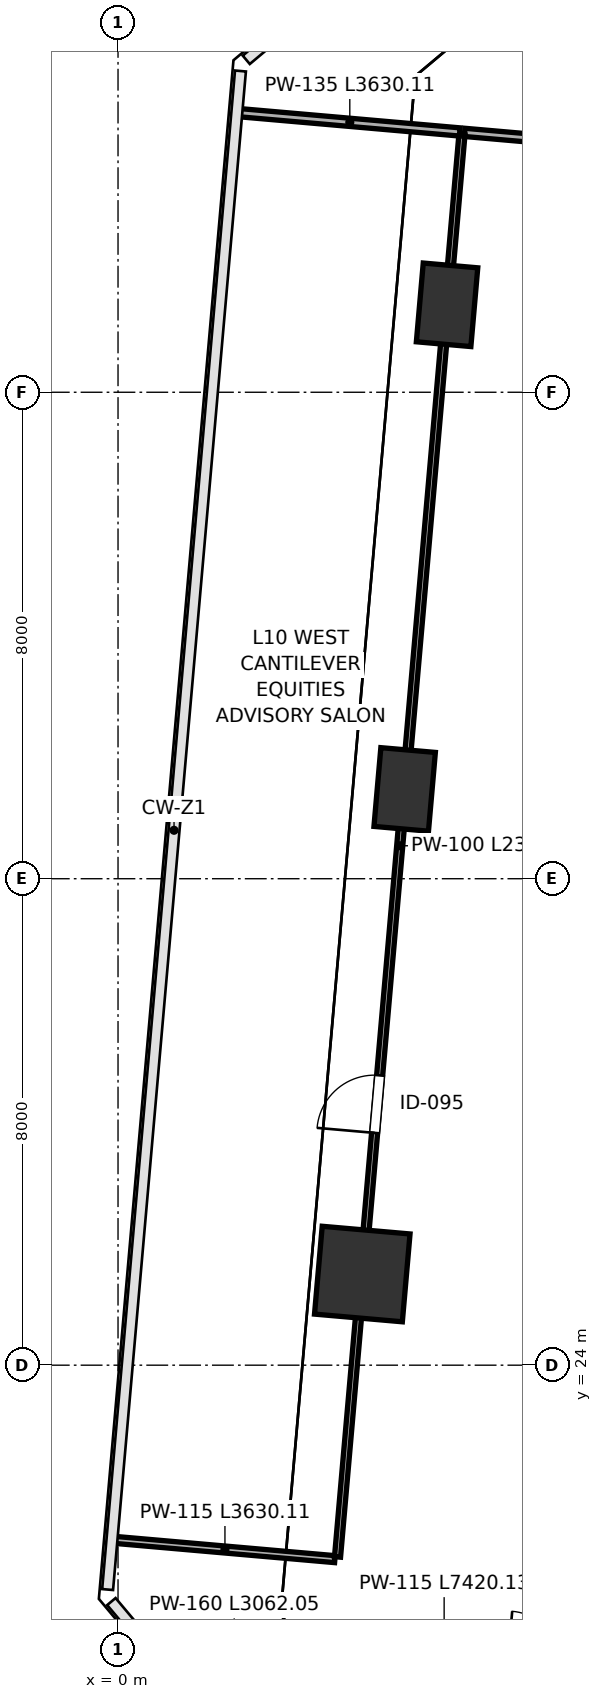
"""IFC4 building model, lengths in metres.
Left out: names, types, materials, properties, quantities, classifications, styles, units other than length and angle.
Written with IfcOpenShell. Run it as: python <this file> out.ifc"""

import sys

from ifc_helpers import new_model, si_unit, direction, frame, frame_2d, origin, origin_2d, place, context, subcontext, project, spatial, rectangle, extrude, source, transform, mapped, element, fill, save


model = new_model("IFC4")
c1 = context("Model", 3, precision=1e-05, world=origin(), true_north=direction((0.0, 1.0)))
c2 = subcontext(c1, "Body", "Model", "MODEL_VIEW")
j1 = project(units=[si_unit("LENGTHUNIT", "METRE"), si_unit("PLANEANGLEUNIT", "RADIAN")], contexts=[c1])
p1 = place(None, origin())
s1 = spatial("IfcSite", under=j1, at=p1, CompositionType="ELEMENT")
p2 = place(p1, origin())
s2 = spatial("IfcBuilding", under=s1, at=p2, CompositionType="ELEMENT")
p3 = place(p2, frame((0.0, 0.0, 47.2)))
s3 = spatial("IfcBuildingStorey", under=s2, at=p3, CompositionType="ELEMENT", Elevation=47.2)
m1 = source(origin(), c2, "Body", "SweptSolid", [
    extrude(rectangle(XDim=1.45, YDim=1.45, at=origin_2d()), origin(), (0.0, 0.0, 1.0), 4.799),
])
p4 = place(p3, frame((4.017, 25.499, 0.001), z_axis=(0.0, 0.0, 1.0), x_axis=(-0.996194698092, 0.087155742748, 0.0)))
e1 = element("IfcColumn", 1, at=p4, inside=s3, PredefinedType="COLUMN", context=c2, shape_type="MappedRepresentation", body=[
    mapped(m1, transform((0.0, 0.0, 0.0), scale=1.0)),
])
m2 = source(origin(), c2, "Body", "SweptSolid", [
    extrude(rectangle(XDim=0.9, YDim=1.3, at=origin_2d()), origin(), (0.0, 0.0, 1.0), 4.799),
])
for number, where, z_axis, x_axis in (
    (2, (4.714, 33.469, 0.001), (0.0, 0.0, 1.0), (-0.996, 0.087, 0.0)),
    (3, (5.411, 41.438, 0.001), (0.0, 0.0, 1.0), (-0.996, 0.087, 0.0)),
):
    element("IfcColumn", number, at=place(p3, frame(where, z_axis=z_axis, x_axis=x_axis)), inside=s3, PredefinedType="PILASTER", context=c2, shape_type="MappedRepresentation", body=[
        mapped(m2, transform((0.0, 0.0, 0.0), scale=1.0)),
    ])
p5 = place(p3, frame((5.7, 44.274, 0.0), z_axis=(0.0, 0.0, 1.0), x_axis=(0.996195324028, -0.087148587968, 0.0)))
e4 = element("IfcWall", 4, at=p5, inside=s3, PredefinedType="PARTITIONING", context=c2, shape_type="SweptSolid", body=[
    extrude(rectangle(XDim=25.07, YDim=0.135, at=frame_2d((12.535, 0.0))), origin(), (0.0, 0.0, 1.0), 4.56),
])
p6 = place(p5, frame((1.05, 0.0, 0.0)))
e5 = element("IfcOpeningElement", 5, at=p6, cuts=e4, PredefinedType="OPENING", context=c2, shape_type="SweptSolid", body=[
    extrude(rectangle(XDim=0.95, YDim=2.15, at=frame_2d((0.475, 1.075))), frame((0.0, 0.078, 0.0), z_axis=(0.0, -1.0, 0.0), x_axis=(1.0, 0.0, 0.0)), (0.0, 0.0, 1.0), 0.155),
])
p7 = place(p3, frame((-0.05, 21.127, 0.0), z_axis=(0.0, 0.0, 1.0), x_axis=(0.996194520424, -0.087157773474, 0.0)))
e6 = element("IfcWall", 6, at=p7, inside=s3, PredefinedType="PARTITIONING", context=c2, shape_type="SweptSolid", body=[
    extrude(rectangle(XDim=3.63, YDim=0.115, at=frame_2d((1.815, 0.0))), origin(), (0.0, 0.0, 1.0), 4.56),
])
p8 = place(p3, frame((3.61, 20.847, 0.0), z_axis=(0.0, 0.0, 1.0), x_axis=(0.087153664928, 0.996194879875, 0.0)))
e7 = element("IfcWall", 7, at=p8, inside=s3, PredefinedType="PARTITIONING", context=c2, shape_type="SweptSolid", body=[
    extrude(rectangle(XDim=23.48, YDim=0.1, at=frame_2d((11.74, 0.0))), origin(), (0.0, 0.0, 1.0), 3.395),
])
p9 = place(p8, frame((7.0, 0.0, 0.0)))
e8 = element("IfcOpeningElement", 8, at=p9, cuts=e7, PredefinedType="OPENING", context=c2, shape_type="SweptSolid", body=[
    extrude(rectangle(XDim=0.95, YDim=2.15, at=frame_2d((0.475, 1.075))), frame((0.0, 0.06, 0.0), z_axis=(0.0, -1.0, 0.0), x_axis=(1.0, 0.0, 0.0)), (0.0, 0.0, 1.0), 0.12),
])
p10 = place(p3, frame((2.004, 44.597, 0.0), z_axis=(0.0, 0.0, 1.0), x_axis=(0.996194520424, -0.087157773474, 0.0)))
e9 = element("IfcWall", 9, at=p10, inside=s3, PredefinedType="PARTITIONING", context=c2, shape_type="SweptSolid", body=[
    extrude(rectangle(XDim=3.63, YDim=0.135, at=frame_2d((1.815, 0.0))), origin(), (0.0, 0.0, 1.0), 4.56),
])
m3 = source(origin(), c2, "Body", "SweptSolid", [
    extrude(rectangle(XDim=0.95, YDim=2.15, at=frame_2d((0.475, 1.075))), frame((0.0, 0.025, 0.0), z_axis=(0.0, -1.0, 0.0), x_axis=(1.0, 0.0, 0.0)), (0.0, 0.0, 1.0), 0.05),
])
p11 = place(p9, origin())
e10 = element("IfcDoor", 10, at=p11, inside=s3, OperationType="SINGLE_SWING_LEFT", PredefinedType="DOOR", context=c2, shape_type="MappedRepresentation", body=[
    mapped(m3, transform((0.0, 0.0, 0.0), scale=1.0)),
])
fill(e8, e10)
save(model, sys.argv[1])
